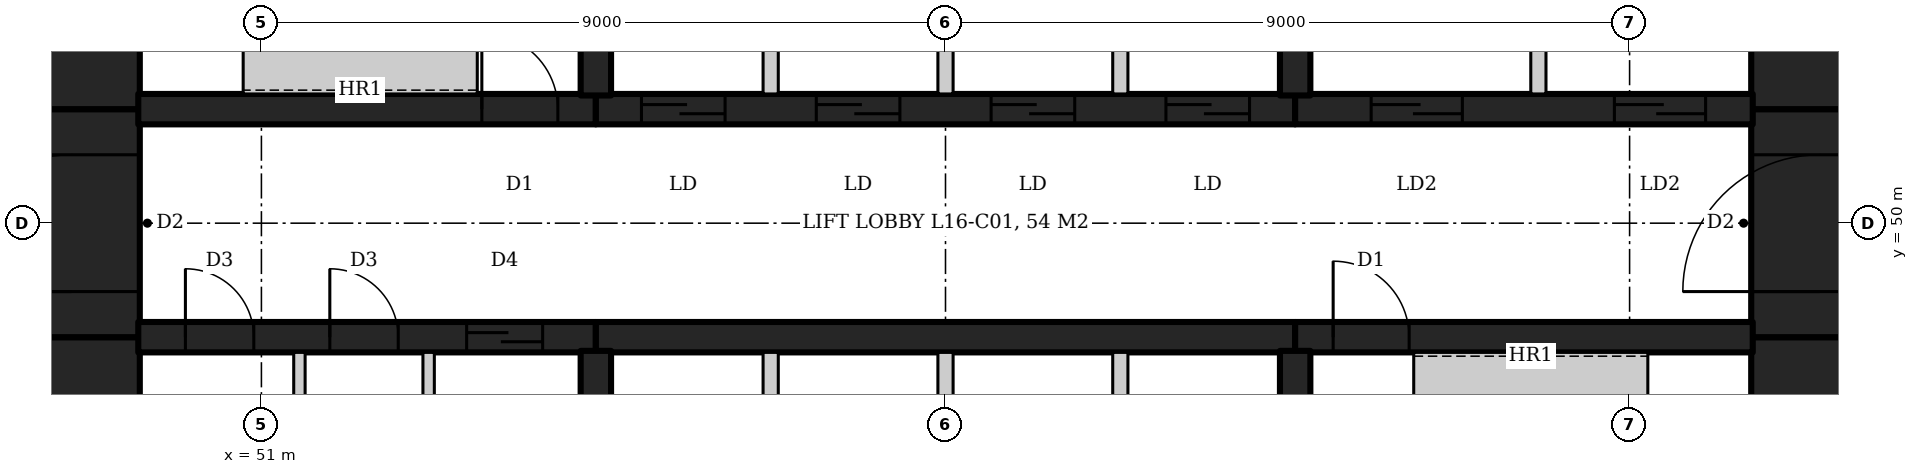
"""IFC4 building model, lengths in metres.
Left out: names, types, materials, properties, quantities, classifications, styles, units other than length and angle.
Written with IfcOpenShell. Run it as: python <this file> out.ifc"""

import sys

from ifc_helpers import new_model, si_unit, direction, frame, frame_2d, origin, place, context, subcontext, project, spatial, rectangle, extrude, element, fill, save


model = new_model("IFC4")
c1 = context("Model", 3, precision=1e-05, world=origin(), true_north=direction((0.0, 1.0)))
c2 = subcontext(c1, "Body", "Model", "MODEL_VIEW")
j1 = project(units=[si_unit("LENGTHUNIT", "METRE"), si_unit("PLANEANGLEUNIT", "RADIAN")], contexts=[c1])
p1 = place(None, origin())
s1 = spatial("IfcSite", under=j1, at=p1, CompositionType="ELEMENT")
p2 = place(p1, origin())
s2 = spatial("IfcBuilding", under=s1, at=p2, CompositionType="ELEMENT")
p3 = place(p2, frame((0.0, 0.0, 68.0)))
s3 = spatial("IfcBuildingStorey", under=s2, at=p3, CompositionType="ELEMENT", Elevation=68.0)
p4 = place(p3, frame((71.5, 45.38, 0.0), z_axis=(0.0, 0.0, 1.0), x_axis=(0.0, 1.0, 0.0)))
e1 = element("IfcWall", 1, at=p4, inside=s3, PredefinedType="SHEAR", context=c2, shape_type="SweptSolid", body=[
    extrude(rectangle(XDim=3.12, YDim=1.8, at=frame_2d((1.56, 0.0))), origin(), (0.0, 0.0, 1.0), 4.2),
])
p5 = place(p3, frame((71.5, 48.5, 0.0), z_axis=(0.0, 0.0, 1.0), x_axis=(0.0, 1.0, 0.0)))
e2 = element("IfcWall", 2, at=p5, inside=s3, PredefinedType="SHEAR", context=c2, shape_type="SweptSolid", body=[
    extrude(rectangle(XDim=3.0, YDim=1.8, at=frame_2d((1.5, 0.0))), origin(), (0.0, 0.0, 1.0), 4.2),
])
p6 = place(p5, frame((0.6, 0.0, 0.0)))
e3 = element("IfcOpeningElement", 3, at=p6, cuts=e2, PredefinedType="OPENING", context=c2, shape_type="SweptSolid", body=[
    extrude(rectangle(XDim=1.8, YDim=2.1, at=frame_2d((0.9, 1.05))), frame((0.0, 0.91, 0.0), z_axis=(0.0, -1.0, 0.0), x_axis=(1.0, 0.0, 0.0)), (0.0, 0.0, 1.0), 1.82),
])
for number, where, z_axis, x_axis in (
    (4, (71.5, 51.5, 0.0), (0.0, 0.0, 1.0), (0.0, 1.0, 0.0)),
    (5, (48.5, 45.38, 0.0), (0.0, 0.0, 1.0), (0.0, 1.0, 0.0)),
):
    element("IfcWall", number, at=place(p3, frame(where, z_axis=z_axis, x_axis=x_axis)), inside=s3, PredefinedType="SHEAR", context=c2, shape_type="SweptSolid", body=[
        extrude(rectangle(XDim=3.12, YDim=1.8, at=frame_2d((1.56, 0.0))), origin(), (0.0, 0.0, 1.0), 4.2),
    ])
p7 = place(p3, frame((48.5, 48.5, 0.0), z_axis=(0.0, 0.0, 1.0), x_axis=(0.0, 1.0, 0.0)))
e6 = element("IfcWall", 6, at=p7, inside=s3, PredefinedType="SHEAR", context=c2, shape_type="SweptSolid", body=[
    extrude(rectangle(XDim=3.0, YDim=1.8, at=frame_2d((1.5, 0.0))), origin(), (0.0, 0.0, 1.0), 4.2),
])
p8 = place(p7, frame((0.6, 0.0, 0.0)))
e7 = element("IfcOpeningElement", 7, at=p8, cuts=e6, PredefinedType="OPENING", context=c2, shape_type="SweptSolid", body=[
    extrude(rectangle(XDim=1.8, YDim=2.1, at=frame_2d((0.9, 1.05))), frame((0.0, 0.91, 0.0), z_axis=(0.0, -1.0, 0.0), x_axis=(1.0, 0.0, 0.0)), (0.0, 0.0, 1.0), 1.82),
])
p9 = place(p3, frame((48.5, 51.5, 0.0), z_axis=(0.0, 0.0, 1.0), x_axis=(0.0, 1.0, 0.0)))
e8 = element("IfcWall", 8, at=p9, inside=s3, PredefinedType="SHEAR", context=c2, shape_type="SweptSolid", body=[
    extrude(rectangle(XDim=3.12, YDim=1.8, at=frame_2d((1.56, 0.0))), origin(), (0.0, 0.0, 1.0), 4.2),
])
p10 = place(p3, frame((49.38, 51.5, 0.0), z_axis=(0.0, 0.0, 1.0), x_axis=(1.0, 0.0, 0.0)))
e9 = element("IfcWall", 9, at=p10, inside=s3, PredefinedType="SHEAR", context=c2, shape_type="SweptSolid", body=[
    extrude(rectangle(XDim=6.02, YDim=0.4, at=frame_2d((3.01, 0.0))), origin(), (0.0, 0.0, 1.0), 4.2),
])
p11 = place(p10, frame((4.52, 0.0, 0.0)))
e10 = element("IfcOpeningElement", 10, at=p11, cuts=e9, PredefinedType="OPENING", context=c2, shape_type="SweptSolid", body=[
    extrude(rectangle(XDim=1.0, YDim=2.1, at=frame_2d((0.5, 1.05))), frame((0.0, 0.21, 0.0), z_axis=(0.0, -1.0, 0.0), x_axis=(1.0, 0.0, 0.0)), (0.0, 0.0, 1.0), 0.42),
])
p12 = place(p3, frame((55.4, 51.5, 0.0), z_axis=(0.0, 0.0, 1.0), x_axis=(1.0, 0.0, 0.0)))
e11 = element("IfcWall", 11, at=p12, inside=s3, PredefinedType="SHEAR", context=c2, shape_type="SweptSolid", body=[
    extrude(rectangle(XDim=9.2, YDim=0.4, at=frame_2d((4.6, 0.0))), origin(), (0.0, 0.0, 1.0), 4.2),
])
p13 = place(p12, frame((0.6, 0.0, 0.0)))
e12 = element("IfcOpeningElement", 12, at=p13, cuts=e11, PredefinedType="OPENING", context=c2, shape_type="SweptSolid", body=[
    extrude(rectangle(XDim=1.1, YDim=2.1, at=frame_2d((0.55, 1.05))), frame((0.0, 0.21, 0.0), z_axis=(0.0, -1.0, 0.0), x_axis=(1.0, 0.0, 0.0)), (0.0, 0.0, 1.0), 0.42),
])
p14 = place(p12, frame((2.9, 0.0, 0.0)))
e13 = element("IfcOpeningElement", 13, at=p14, cuts=e11, PredefinedType="OPENING", context=c2, shape_type="SweptSolid", body=[
    extrude(rectangle(XDim=1.1, YDim=2.1, at=frame_2d((0.55, 1.05))), frame((0.0, 0.21, 0.0), z_axis=(0.0, -1.0, 0.0), x_axis=(1.0, 0.0, 0.0)), (0.0, 0.0, 1.0), 0.42),
])
p15 = place(p12, frame((5.2, 0.0, 0.0)))
e14 = element("IfcOpeningElement", 14, at=p15, cuts=e11, PredefinedType="OPENING", context=c2, shape_type="SweptSolid", body=[
    extrude(rectangle(XDim=1.1, YDim=2.1, at=frame_2d((0.55, 1.05))), frame((0.0, 0.21, 0.0), z_axis=(0.0, -1.0, 0.0), x_axis=(1.0, 0.0, 0.0)), (0.0, 0.0, 1.0), 0.42),
])
p16 = place(p12, frame((7.5, 0.0, 0.0)))
e15 = element("IfcOpeningElement", 15, at=p16, cuts=e11, PredefinedType="OPENING", context=c2, shape_type="SweptSolid", body=[
    extrude(rectangle(XDim=1.1, YDim=2.1, at=frame_2d((0.55, 1.05))), frame((0.0, 0.21, 0.0), z_axis=(0.0, -1.0, 0.0), x_axis=(1.0, 0.0, 0.0)), (0.0, 0.0, 1.0), 0.42),
])
p17 = place(p3, frame((64.6, 51.5, 0.0), z_axis=(0.0, 0.0, 1.0), x_axis=(1.0, 0.0, 0.0)))
e16 = element("IfcWall", 16, at=p17, inside=s3, PredefinedType="SHEAR", context=c2, shape_type="SweptSolid", body=[
    extrude(rectangle(XDim=6.02, YDim=0.4, at=frame_2d((3.01, 0.0))), origin(), (0.0, 0.0, 1.0), 4.2),
])
p18 = place(p17, frame((1.0, 0.0, 0.0)))
e17 = element("IfcOpeningElement", 17, at=p18, cuts=e16, PredefinedType="OPENING", context=c2, shape_type="SweptSolid", body=[
    extrude(rectangle(XDim=1.2, YDim=2.1, at=frame_2d((0.6, 1.05))), frame((0.0, 0.21, 0.0), z_axis=(0.0, -1.0, 0.0), x_axis=(1.0, 0.0, 0.0)), (0.0, 0.0, 1.0), 0.42),
])
p19 = place(p17, frame((4.2, 0.0, 0.0)))
e18 = element("IfcOpeningElement", 18, at=p19, cuts=e16, PredefinedType="OPENING", context=c2, shape_type="SweptSolid", body=[
    extrude(rectangle(XDim=1.2, YDim=2.1, at=frame_2d((0.6, 1.05))), frame((0.0, 0.21, 0.0), z_axis=(0.0, -1.0, 0.0), x_axis=(1.0, 0.0, 0.0)), (0.0, 0.0, 1.0), 0.42),
])
p20 = place(p3, frame((49.38, 48.5, 0.0), z_axis=(0.0, 0.0, 1.0), x_axis=(1.0, 0.0, 0.0)))
e19 = element("IfcWall", 19, at=p20, inside=s3, PredefinedType="SHEAR", context=c2, shape_type="SweptSolid", body=[
    extrude(rectangle(XDim=6.02, YDim=0.4, at=frame_2d((3.01, 0.0))), origin(), (0.0, 0.0, 1.0), 4.2),
])
p21 = place(p20, frame((0.62, 0.0, 0.0)))
e20 = element("IfcOpeningElement", 20, at=p21, cuts=e19, PredefinedType="OPENING", context=c2, shape_type="SweptSolid", body=[
    extrude(rectangle(XDim=0.9, YDim=2.1, at=frame_2d((0.45, 1.05))), frame((0.0, 0.21, 0.0), z_axis=(0.0, -1.0, 0.0), x_axis=(1.0, 0.0, 0.0)), (0.0, 0.0, 1.0), 0.42),
])
p22 = place(p20, frame((2.52, 0.0, 0.0)))
e21 = element("IfcOpeningElement", 21, at=p22, cuts=e19, PredefinedType="OPENING", context=c2, shape_type="SweptSolid", body=[
    extrude(rectangle(XDim=0.9, YDim=2.1, at=frame_2d((0.45, 1.05))), frame((0.0, 0.21, 0.0), z_axis=(0.0, -1.0, 0.0), x_axis=(1.0, 0.0, 0.0)), (0.0, 0.0, 1.0), 0.42),
])
p23 = place(p20, frame((4.32, 0.0, 0.0)))
e22 = element("IfcOpeningElement", 22, at=p23, cuts=e19, PredefinedType="OPENING", context=c2, shape_type="SweptSolid", body=[
    extrude(rectangle(XDim=1.0, YDim=2.1, at=frame_2d((0.5, 1.05))), frame((0.0, 0.21, 0.0), z_axis=(0.0, -1.0, 0.0), x_axis=(1.0, 0.0, 0.0)), (0.0, 0.0, 1.0), 0.42),
])
p24 = place(p3, frame((55.4, 48.5, 0.0), z_axis=(0.0, 0.0, 1.0), x_axis=(1.0, 0.0, 0.0)))
e23 = element("IfcWall", 23, at=p24, inside=s3, PredefinedType="SHEAR", context=c2, shape_type="SweptSolid", body=[
    extrude(rectangle(XDim=9.2, YDim=0.4, at=frame_2d((4.6, 0.0))), origin(), (0.0, 0.0, 1.0), 4.2),
])
p25 = place(p3, frame((64.6, 48.5, 0.0), z_axis=(0.0, 0.0, 1.0), x_axis=(1.0, 0.0, 0.0)))
e24 = element("IfcWall", 24, at=p25, inside=s3, PredefinedType="SHEAR", context=c2, shape_type="SweptSolid", body=[
    extrude(rectangle(XDim=6.02, YDim=0.4, at=frame_2d((3.01, 0.0))), origin(), (0.0, 0.0, 1.0), 4.2),
])
p26 = place(p25, frame((0.5, 0.0, 0.0)))
e25 = element("IfcOpeningElement", 25, at=p26, cuts=e24, PredefinedType="OPENING", context=c2, shape_type="SweptSolid", body=[
    extrude(rectangle(XDim=1.0, YDim=2.1, at=frame_2d((0.5, 1.05))), frame((0.0, 0.21, 0.0), z_axis=(0.0, -1.0, 0.0), x_axis=(1.0, 0.0, 0.0)), (0.0, 0.0, 1.0), 0.42),
])
for number, where, z_axis, x_axis in (
    (26, (55.4, 51.68, 0.0), (0.0, 0.0, 1.0), (0.0, 1.0, 0.0)),
    (27, (64.6, 51.68, 0.0), (0.0, 0.0, 1.0), (0.0, 1.0, 0.0)),
    (28, (55.4, 48.32, 0.0), (0.0, 0.0, 1.0), (0.0, -1.0, 0.0)),
    (29, (64.6, 48.32, 0.0), (0.0, 0.0, 1.0), (0.0, -1.0, 0.0)),
):
    element("IfcWall", number, at=place(p3, frame(where, z_axis=z_axis, x_axis=x_axis)), inside=s3, PredefinedType="SHEAR", context=c2, shape_type="SweptSolid", body=[
        extrude(rectangle(XDim=2.94, YDim=0.4, at=frame_2d((1.47, 0.0))), origin(), (0.0, 0.0, 1.0), 4.2),
    ])
for number, where, z_axis, x_axis in (
    (30, (57.7, 51.7, 0.0), (0.0, 0.0, 1.0), (0.0, 1.0, 0.0)),
    (31, (60.0, 51.7, 0.0), (0.0, 0.0, 1.0), (0.0, 1.0, 0.0)),
    (32, (62.3, 51.7, 0.0), (0.0, 0.0, 1.0), (0.0, 1.0, 0.0)),
    (33, (57.7, 45.4, 0.0), (0.0, 0.0, 1.0), (0.0, 1.0, 0.0)),
    (34, (60.0, 45.4, 0.0), (0.0, 0.0, 1.0), (0.0, 1.0, 0.0)),
    (35, (62.3, 45.4, 0.0), (0.0, 0.0, 1.0), (0.0, 1.0, 0.0)),
    (36, (67.8, 51.7, 0.0), (0.0, 0.0, 1.0), (0.0, 1.0, 0.0)),
):
    element("IfcWall", number, at=place(p3, frame(where, z_axis=z_axis, x_axis=x_axis)), inside=s3, PredefinedType="PARTITIONING", context=c2, shape_type="SweptSolid", body=[
        extrude(rectangle(XDim=2.9, YDim=0.2, at=frame_2d((1.45, 0.0))), origin(), (0.0, 0.0, 1.0), 4.2),
    ])
for number, where, z_axis, x_axis in (
    (37, (51.5, 45.4, 0.0), (0.0, 0.0, 1.0), (0.0, 1.0, 0.0)),
    (38, (53.2, 45.4, 0.0), (0.0, 0.0, 1.0), (0.0, 1.0, 0.0)),
):
    element("IfcWall", number, at=place(p3, frame(where, z_axis=z_axis, x_axis=x_axis)), inside=s3, PredefinedType="PARTITIONING", context=c2, shape_type="SweptSolid", body=[
        extrude(rectangle(XDim=2.9, YDim=0.15, at=frame_2d((1.45, 0.0))), origin(), (0.0, 0.0, 1.0), 4.04),
    ])
p27 = place(p11, origin())
e39 = element("IfcDoor", 39, at=p27, inside=s3, OperationType="SINGLE_SWING_LEFT", PredefinedType="DOOR", context=c2, shape_type="SweptSolid", body=[
    extrude(rectangle(XDim=1.0, YDim=2.1, at=frame_2d((0.5, 1.05))), frame((0.0, 0.025, 0.0), z_axis=(0.0, -1.0, 0.0), x_axis=(1.0, 0.0, 0.0)), (0.0, 0.0, 1.0), 0.05),
])
fill(e10, e39)
p28 = place(p26, origin())
e40 = element("IfcDoor", 40, at=p28, inside=s3, OperationType="SINGLE_SWING_LEFT", PredefinedType="DOOR", context=c2, shape_type="SweptSolid", body=[
    extrude(rectangle(XDim=1.0, YDim=2.1, at=frame_2d((0.5, 1.05))), frame((0.0, 0.025, 0.0), z_axis=(0.0, -1.0, 0.0), x_axis=(1.0, 0.0, 0.0)), (0.0, 0.0, 1.0), 0.05),
])
fill(e25, e40)
p29 = place(p18, origin())
e41 = element("IfcDoor", 41, at=p29, inside=s3, OperationType="SLIDING_TO_LEFT", PredefinedType="DOOR", context=c2, shape_type="SweptSolid", body=[
    extrude(rectangle(XDim=1.2, YDim=2.1, at=frame_2d((0.6, 1.05))), frame((0.0, 0.025, 0.0), z_axis=(0.0, -1.0, 0.0), x_axis=(1.0, 0.0, 0.0)), (0.0, 0.0, 1.0), 0.05),
])
fill(e17, e41)
p30 = place(p19, origin())
e42 = element("IfcDoor", 42, at=p30, inside=s3, OperationType="SLIDING_TO_LEFT", PredefinedType="DOOR", context=c2, shape_type="SweptSolid", body=[
    extrude(rectangle(XDim=1.2, YDim=2.1, at=frame_2d((0.6, 1.05))), frame((0.0, 0.025, 0.0), z_axis=(0.0, -1.0, 0.0), x_axis=(1.0, 0.0, 0.0)), (0.0, 0.0, 1.0), 0.05),
])
fill(e18, e42)
p31 = place(p13, origin())
e43 = element("IfcDoor", 43, at=p31, inside=s3, OperationType="SLIDING_TO_LEFT", PredefinedType="DOOR", context=c2, shape_type="SweptSolid", body=[
    extrude(rectangle(XDim=1.1, YDim=2.1, at=frame_2d((0.55, 1.05))), frame((0.0, 0.025, 0.0), z_axis=(0.0, -1.0, 0.0), x_axis=(1.0, 0.0, 0.0)), (0.0, 0.0, 1.0), 0.05),
])
fill(e12, e43)
p32 = place(p14, origin())
e44 = element("IfcDoor", 44, at=p32, inside=s3, OperationType="SLIDING_TO_LEFT", PredefinedType="DOOR", context=c2, shape_type="SweptSolid", body=[
    extrude(rectangle(XDim=1.1, YDim=2.1, at=frame_2d((0.55, 1.05))), frame((0.0, 0.025, 0.0), z_axis=(0.0, -1.0, 0.0), x_axis=(1.0, 0.0, 0.0)), (0.0, 0.0, 1.0), 0.05),
])
fill(e13, e44)
p33 = place(p15, origin())
e45 = element("IfcDoor", 45, at=p33, inside=s3, OperationType="SLIDING_TO_LEFT", PredefinedType="DOOR", context=c2, shape_type="SweptSolid", body=[
    extrude(rectangle(XDim=1.1, YDim=2.1, at=frame_2d((0.55, 1.05))), frame((0.0, 0.025, 0.0), z_axis=(0.0, -1.0, 0.0), x_axis=(1.0, 0.0, 0.0)), (0.0, 0.0, 1.0), 0.05),
])
fill(e14, e45)
p34 = place(p16, origin())
e46 = element("IfcDoor", 46, at=p34, inside=s3, OperationType="SLIDING_TO_LEFT", PredefinedType="DOOR", context=c2, shape_type="SweptSolid", body=[
    extrude(rectangle(XDim=1.1, YDim=2.1, at=frame_2d((0.55, 1.05))), frame((0.0, 0.025, 0.0), z_axis=(0.0, -1.0, 0.0), x_axis=(1.0, 0.0, 0.0)), (0.0, 0.0, 1.0), 0.05),
])
fill(e15, e46)
p35 = place(p21, origin())
e47 = element("IfcDoor", 47, at=p35, inside=s3, OperationType="SINGLE_SWING_RIGHT", PredefinedType="DOOR", context=c2, shape_type="SweptSolid", body=[
    extrude(rectangle(XDim=0.9, YDim=2.1, at=frame_2d((0.45, 1.05))), frame((0.0, 0.025, 0.0), z_axis=(0.0, -1.0, 0.0), x_axis=(1.0, 0.0, 0.0)), (0.0, 0.0, 1.0), 0.05),
])
fill(e20, e47)
p36 = place(p22, origin())
e48 = element("IfcDoor", 48, at=p36, inside=s3, OperationType="SINGLE_SWING_RIGHT", PredefinedType="DOOR", context=c2, shape_type="SweptSolid", body=[
    extrude(rectangle(XDim=0.9, YDim=2.1, at=frame_2d((0.45, 1.05))), frame((0.0, 0.025, 0.0), z_axis=(0.0, -1.0, 0.0), x_axis=(1.0, 0.0, 0.0)), (0.0, 0.0, 1.0), 0.05),
])
fill(e21, e48)
p37 = place(p23, origin())
e49 = element("IfcDoor", 49, at=p37, inside=s3, OperationType="SLIDING_TO_LEFT", PredefinedType="DOOR", context=c2, shape_type="SweptSolid", body=[
    extrude(rectangle(XDim=1.0, YDim=2.1, at=frame_2d((0.5, 1.05))), frame((0.0, 0.025, 0.0), z_axis=(0.0, -1.0, 0.0), x_axis=(1.0, 0.0, 0.0)), (0.0, 0.0, 1.0), 0.05),
])
fill(e22, e49)
p38 = place(p6, origin())
e50 = element("IfcDoor", 50, at=p38, inside=s3, OperationType="DOUBLE_DOOR_DOUBLE_SWING", PredefinedType="DOOR", context=c2, shape_type="SweptSolid", body=[
    extrude(rectangle(XDim=1.8, YDim=2.1, at=frame_2d((0.9, 1.05))), frame((0.0, 0.025, 0.0), z_axis=(0.0, -1.0, 0.0), x_axis=(1.0, 0.0, 0.0)), (0.0, 0.0, 1.0), 0.05),
])
fill(e3, e50)
p39 = place(p8, origin())
e51 = element("IfcDoor", 51, at=p39, inside=s3, OperationType="DOUBLE_DOOR_DOUBLE_SWING", PredefinedType="DOOR", context=c2, shape_type="SweptSolid", body=[
    extrude(rectangle(XDim=1.8, YDim=2.1, at=frame_2d((0.9, 1.05))), frame((0.0, 0.025, 0.0), z_axis=(0.0, -1.0, 0.0), x_axis=(1.0, 0.0, 0.0)), (0.0, 0.0, 1.0), 0.05),
])
fill(e7, e51)
save(model, sys.argv[1])
